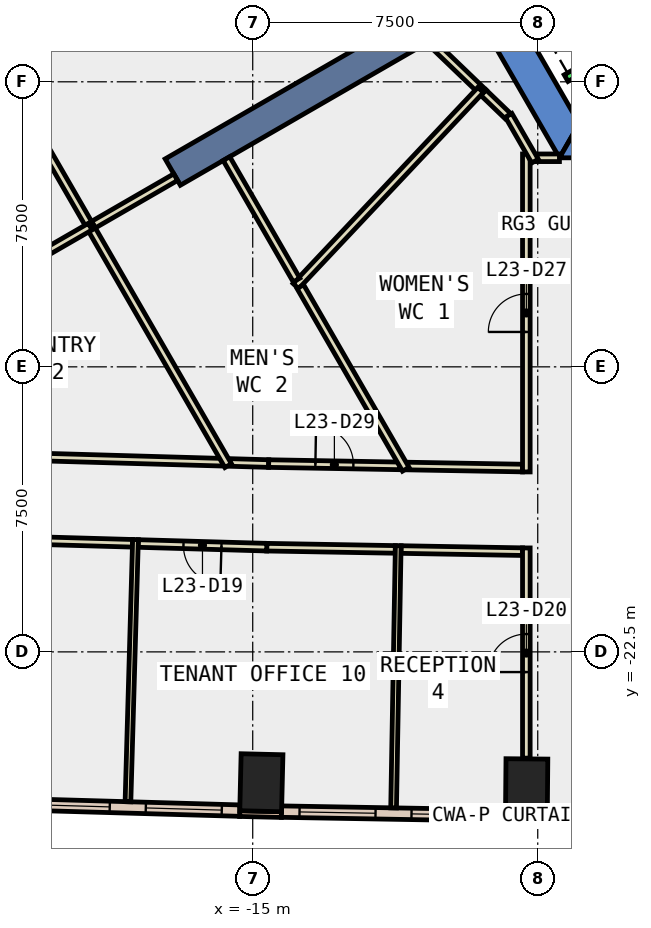
"""IFC4 building model, lengths in metres.
Left out: names, types, materials, properties, quantities, classifications, styles, units other than length and angle.
Written with IfcOpenShell. Run it as: python <this file> out.ifc"""

import sys

from ifc_helpers import new_model, si_unit, direction, frame, frame_2d, origin, origin_2d, place, context, subcontext, project, spatial, polyline, rectangle, outline, extrude, element, fill, save


model = new_model("IFC4")
c1 = context("Model", 3, precision=1e-05, world=origin(), true_north=direction((0.0, 1.0)))
c2 = subcontext(c1, "Body", "Model", "MODEL_VIEW")
j1 = project(units=[si_unit("LENGTHUNIT", "METRE"), si_unit("PLANEANGLEUNIT", "RADIAN")], contexts=[c1])
p1 = place(None, origin())
s1 = spatial("IfcSite", under=j1, at=p1, CompositionType="ELEMENT")
p2 = place(p1, origin())
s2 = spatial("IfcBuilding", under=s1, at=p2, CompositionType="ELEMENT")
p3 = place(p2, frame((0.0, 0.0, 107.6)))
s3 = spatial("IfcBuildingStorey", under=s2, at=p3, CompositionType="ELEMENT", Elevation=107.6)
for number, where, z_axis, x_axis in (
    (1, (-14.773, -25.943, -0.4), (0.0, 0.0, 1.0), (-1.0, 0.024, 0.0)),
    (2, (-7.792, -26.066, -0.4), (0.0, 0.0, 1.0), (-1.0, 0.009, 0.0)),
):
    element("IfcColumn", number, at=place(p3, frame(where, z_axis=z_axis, x_axis=x_axis)), inside=s3, PredefinedType="COLUMN", context=c2, shape_type="SweptSolid", body=[
        extrude(rectangle(XDim=1.1, YDim=1.5, at=origin_2d()), origin(), (0.0, 0.0, 1.0), 4.2),
    ])
p4 = place(p3, frame((0.0, 0.0, -0.4)))
e3 = element("IfcWall", 3, at=p4, inside=s3, PredefinedType="SHEAR", context=c2, shape_type="SweptSolid", body=[
    extrude(outline(polyline([(-13.856, 2.5), (-6.928, -9.5), (-6.409, -8.6), (-12.817, 2.5), (-13.856, 2.5)])), origin(), (0.0, 0.0, 1.0), 4.2),
])
p5 = place(p3, frame((0.0, 0.0, -0.4)))
e4 = element("IfcWall", 4, at=p5, inside=s3, PredefinedType="SHEAR", context=c2, shape_type="SweptSolid", body=[
    extrude(outline(polyline([(3.75, -9.5), (3.75, -8.6), (-6.409, -8.6), (-6.928, -9.5), (3.75, -9.5)])), origin(), (0.0, 0.0, 1.0), 4.2),
])
p6 = place(p3, frame((-9.31, -5.375, -0.4), z_axis=(0.0, 0.0, 1.0), x_axis=(-0.866017533419, -0.500013631625, 0.0)))
e5 = element("IfcWall", 5, at=p6, inside=s3, PredefinedType="SHEAR", context=c2, shape_type="SweptSolid", body=[
    extrude(rectangle(XDim=9.0, YDim=0.8, at=frame_2d((4.5, 0.0))), origin(), (0.0, 0.0, 1.0), 4.2),
])
p7 = place(p3, frame((-15.343, -26.755, 0.0), z_axis=(0.0, 0.0, 1.0), x_axis=(0.999718180159, -0.023739424163, 0.0)))
e6 = element("IfcWall", 6, at=p7, inside=s3, PredefinedType="STANDARD", context=c2, shape_type="SweptSolid", body=[
    extrude(rectangle(XDim=1.1, YDim=0.15, at=frame_2d((0.55, 0.0))), origin(), (0.0, 0.0, 1.0), 3.8),
])
p8 = place(p3, frame((-8.349, -26.886, 0.0), z_axis=(0.0, 0.0, 1.0), x_axis=(0.99995860686, -0.009098602504, 0.0)))
e7 = element("IfcWall", 7, at=p8, inside=s3, PredefinedType="STANDARD", context=c2, shape_type="SweptSolid", body=[
    extrude(rectangle(XDim=1.1, YDim=0.15, at=frame_2d((0.55, 0.0))), origin(), (0.0, 0.0, 1.0), 3.8),
])
p9 = place(p3, frame((-21.235, -26.508, 0.0), z_axis=(0.0, 0.0, 1.0), x_axis=(0.999589583914, -0.028647229026, 0.0)))
e8 = element("IfcWall", 8, at=p9, inside=s3, PredefinedType="STANDARD", context=c2, shape_type="SweptSolid", body=[
    extrude(rectangle(XDim=5.897, YDim=0.3, at=frame_2d((2.949, 0.0))), origin(), (0.0, 0.0, 1.0), 3.8),
])
p10 = place(p9, frame((0.474, 0.0, 0.9)))
e9 = element("IfcOpeningElement", 9, at=p10, cuts=e8, PredefinedType="OPENING", context=c2, shape_type="SweptSolid", body=[
    extrude(rectangle(XDim=2.0, YDim=2.6, at=frame_2d((1.0, 1.3))), frame((0.0, 0.16, 0.0), z_axis=(0.0, -1.0, 0.0), x_axis=(1.0, 0.0, 0.0)), (0.0, 0.0, 1.0), 0.32),
])
p11 = place(p9, frame((3.423, 0.0, 0.9)))
e10 = element("IfcOpeningElement", 10, at=p11, cuts=e8, PredefinedType="OPENING", context=c2, shape_type="SweptSolid", body=[
    extrude(rectangle(XDim=2.0, YDim=2.6, at=frame_2d((1.0, 1.3))), frame((0.0, 0.16, 0.0), z_axis=(0.0, -1.0, 0.0), x_axis=(1.0, 0.0, 0.0)), (0.0, 0.0, 1.0), 0.32),
])
p12 = place(p3, frame((-14.242, -26.703, 0.0), z_axis=(0.0, 0.0, 1.0), x_axis=(0.999847261365, -0.017477240672, 0.0)))
e11 = element("IfcWall", 11, at=p12, inside=s3, PredefinedType="STANDARD", context=c2, shape_type="SweptSolid", body=[
    extrude(rectangle(XDim=5.895, YDim=0.3, at=frame_2d((2.948, 0.0))), origin(), (0.0, 0.0, 1.0), 3.8),
])
p13 = place(p12, frame((0.474, 0.0, 0.9)))
e12 = element("IfcOpeningElement", 12, at=p13, cuts=e11, PredefinedType="OPENING", context=c2, shape_type="SweptSolid", body=[
    extrude(rectangle(XDim=2.0, YDim=2.6, at=frame_2d((1.0, 1.3))), frame((0.0, 0.16, 0.0), z_axis=(0.0, -1.0, 0.0), x_axis=(1.0, 0.0, 0.0)), (0.0, 0.0, 1.0), 0.32),
])
p14 = place(p12, frame((3.421, 0.0, 0.9)))
e13 = element("IfcOpeningElement", 13, at=p14, cuts=e11, PredefinedType="OPENING", context=c2, shape_type="SweptSolid", body=[
    extrude(rectangle(XDim=2.0, YDim=2.6, at=frame_2d((1.0, 1.3))), frame((0.0, 0.16, 0.0), z_axis=(0.0, -1.0, 0.0), x_axis=(1.0, 0.0, 0.0)), (0.0, 0.0, 1.0), 0.32),
])
p15 = place(p3, frame((-10.923, -17.61, 0.0), z_axis=(0.0, 0.0, 1.0), x_axis=(0.999846489632, -0.017521334753, 0.0)))
e14 = element("IfcWall", 14, at=p15, inside=s3, PredefinedType="PARTITIONING", context=c2, shape_type="SweptSolid", body=[
    extrude(rectangle(XDim=3.024, YDim=0.2, at=frame_2d((1.512, 0.0))), origin(), (0.0, 0.0, 1.0), 3.8),
])
p16 = place(p3, frame((-15.596, -17.516, 0.0), z_axis=(0.0, 0.0, 1.0), x_axis=(0.99959813819, -0.028347171427, 0.0)))
e15 = element("IfcWall", 15, at=p16, inside=s3, PredefinedType="PARTITIONING", context=c2, shape_type="SweptSolid", body=[
    extrude(rectangle(XDim=1.016, YDim=0.2, at=frame_2d((0.508, 0.0))), origin(), (0.0, 0.0, 1.0), 3.8),
])
p17 = place(p3, frame((-14.58, -17.545, 0.0), z_axis=(0.0, 0.0, 1.0), x_axis=(0.999844180431, -0.01765261618, 0.0)))
e16 = element("IfcWall", 16, at=p17, inside=s3, PredefinedType="PARTITIONING", context=c2, shape_type="SweptSolid", body=[
    extrude(rectangle(XDim=3.458, YDim=0.2, at=frame_2d((1.729, 0.0))), origin(), (0.0, 0.0, 1.0), 3.8),
])
p18 = place(p17, frame((1.229, 0.0, 0.0)))
e17 = element("IfcOpeningElement", 17, at=p18, cuts=e16, PredefinedType="OPENING", context=c2, shape_type="SweptSolid", body=[
    extrude(rectangle(XDim=1.0, YDim=2.1, at=frame_2d((0.5, 1.05))), frame((0.0, 0.11, 0.0), z_axis=(0.0, -1.0, 0.0), x_axis=(1.0, 0.0, 0.0)), (0.0, 0.0, 1.0), 0.22),
])
p19 = place(p3, frame((-21.471, -17.347, 0.0), z_axis=(0.0, 0.0, 1.0), x_axis=(0.999587337564, -0.028725504044, 0.0)))
e18 = element("IfcWall", 18, at=p19, inside=s3, PredefinedType="PARTITIONING", context=c2, shape_type="SweptSolid", body=[
    extrude(rectangle(XDim=5.677, YDim=0.2, at=frame_2d((2.839, 0.0))), origin(), (0.0, 0.0, 1.0), 3.8),
])
p20 = place(p3, frame((-18.163, -19.643, 0.0), z_axis=(0.0, 0.0, 1.0), x_axis=(-0.999588017684, 0.028701827504, 0.0)))
e19 = element("IfcWall", 19, at=p20, inside=s3, PredefinedType="PARTITIONING", context=c2, shape_type="SweptSolid", body=[
    extrude(rectangle(XDim=3.385, YDim=0.2, at=frame_2d((1.693, 0.0))), origin(), (0.0, 0.0, 1.0), 3.8),
])
p21 = place(p3, frame((-11.248, -19.804, 0.0), z_axis=(0.0, 0.0, 1.0), x_axis=(-0.999848794654, 0.017389302123, 0.0)))
e20 = element("IfcWall", 20, at=p21, inside=s3, PredefinedType="PARTITIONING", context=c2, shape_type="SweptSolid", body=[
    extrude(rectangle(XDim=3.384, YDim=0.2, at=frame_2d((1.692, 0.0))), origin(), (0.0, 0.0, 1.0), 3.8),
])
p22 = place(p3, frame((-14.631, -19.745, 0.0), z_axis=(0.0, 0.0, 1.0), x_axis=(-0.999587482491, 0.028720460441, 0.0)))
e21 = element("IfcWall", 21, at=p22, inside=s3, PredefinedType="PARTITIONING", context=c2, shape_type="SweptSolid", body=[
    extrude(rectangle(XDim=3.383, YDim=0.2, at=frame_2d((1.692, 0.0))), origin(), (0.0, 0.0, 1.0), 3.8),
])
p23 = place(p22, frame((1.192, 0.0, 0.0)))
e22 = element("IfcOpeningElement", 22, at=p23, cuts=e21, PredefinedType="OPENING", context=c2, shape_type="SweptSolid", body=[
    extrude(rectangle(XDim=1.0, YDim=2.1, at=frame_2d((0.5, 1.05))), frame((0.0, 0.11, 0.0), z_axis=(0.0, -1.0, 0.0), x_axis=(1.0, 0.0, 0.0)), (0.0, 0.0, 1.0), 0.22),
])
p24 = place(p3, frame((-7.9, -19.863, 0.0), z_axis=(0.0, 0.0, 1.0), x_axis=(-0.999845883554, 0.017555886191, 0.0)))
e23 = element("IfcWall", 23, at=p24, inside=s3, PredefinedType="PARTITIONING", context=c2, shape_type="SweptSolid", body=[
    extrude(rectangle(XDim=3.198, YDim=0.2, at=frame_2d((1.599, 0.0))), origin(), (0.0, 0.0, 1.0), 3.8),
])
p25 = place(p3, frame((-7.522, -9.499, 0.0), z_axis=(0.0, 0.0, 1.0), x_axis=(1.0, 0.0, 0.0)))
e24 = element("IfcWall", 24, at=p25, inside=s3, PredefinedType="PARTITIONING", context=c2, shape_type="SweptSolid", body=[
    extrude(rectangle(XDim=0.593, YDim=0.2, at=frame_2d((0.296, 0.0))), origin(), (0.0, 0.0, 1.0), 3.8),
])
p26 = place(p3, frame((-7.8, -17.765, 0.0), z_axis=(0.0, 0.0, 1.0), x_axis=(0.0, 1.0, 0.0)))
e25 = element("IfcWall", 25, at=p26, inside=s3, PredefinedType="PARTITIONING", context=c2, shape_type="SweptSolid", body=[
    extrude(rectangle(XDim=8.366, YDim=0.2, at=frame_2d((4.183, 0.0))), origin(), (0.0, 0.0, 1.0), 3.8),
])
p27 = place(p26, frame((3.683, 0.0, 0.0)))
e26 = element("IfcOpeningElement", 26, at=p27, cuts=e25, PredefinedType="OPENING", context=c2, shape_type="SweptSolid", body=[
    extrude(rectangle(XDim=1.0, YDim=2.1, at=frame_2d((0.5, 1.05))), frame((0.0, 0.11, 0.0), z_axis=(0.0, -1.0, 0.0), x_axis=(1.0, 0.0, 0.0)), (0.0, 0.0, 1.0), 0.22),
])
p28 = place(p3, frame((-7.8, -25.296, 0.0), z_axis=(0.0, 0.0, 1.0), x_axis=(0.0, 1.0, 0.0)))
e27 = element("IfcWall", 27, at=p28, inside=s3, PredefinedType="PARTITIONING", context=c2, shape_type="SweptSolid", body=[
    extrude(rectangle(XDim=5.531, YDim=0.2, at=frame_2d((2.766, 0.0))), origin(), (0.0, 0.0, 1.0), 3.8),
])
p29 = place(p28, frame((2.265, 0.0, 0.0)))
e28 = element("IfcOpeningElement", 28, at=p29, cuts=e27, PredefinedType="OPENING", context=c2, shape_type="SweptSolid", body=[
    extrude(rectangle(XDim=1.0, YDim=2.1, at=frame_2d((0.5, 1.05))), frame((0.0, 0.11, 0.0), z_axis=(0.0, -1.0, 0.0), x_axis=(1.0, 0.0, 0.0)), (0.0, 0.0, 1.0), 0.22),
])
p30 = place(p3, frame((-8.93, -7.783, 0.0), z_axis=(0.0, 0.0, 1.0), x_axis=(0.720954255291, -0.692982656189, 0.0)))
e29 = element("IfcWall", 29, at=p30, inside=s3, PredefinedType="PARTITIONING", context=c2, shape_type="SweptSolid", body=[
    extrude(rectangle(XDim=0.89, YDim=0.2, at=frame_2d((0.445, 0.0))), origin(), (0.0, 0.0, 1.0), 3.8),
])
p31 = place(p3, frame((-7.572, -9.586, 0.0), z_axis=(0.0, 0.0, 1.0), x_axis=(-0.499484152563, 0.866323023669, 0.0)))
e30 = element("IfcWall", 30, at=p31, inside=s3, PredefinedType="PARTITIONING", context=c2, shape_type="SweptSolid", body=[
    extrude(rectangle(XDim=1.39, YDim=0.2, at=frame_2d((0.695, 0.0))), origin(), (0.0, 0.0, 1.0), 3.8),
])
p32 = place(p3, frame((-8.93, -7.783, 0.0), z_axis=(0.0, 0.0, 1.0), x_axis=(-0.72124523191, 0.692679807305, 0.0)))
e31 = element("IfcWall", 31, at=p32, inside=s3, PredefinedType="PARTITIONING", context=c2, shape_type="SweptSolid", body=[
    extrude(rectangle(XDim=1.923, YDim=0.2, at=frame_2d((0.961, 0.0))), origin(), (0.0, 0.0, 1.0), 3.8),
])
p33 = place(p3, frame((-13.865, -12.876, 0.0), z_axis=(0.0, 0.0, 1.0), x_axis=(0.685651384846, 0.727930064263, 0.0)))
e32 = element("IfcWall", 32, at=p33, inside=s3, PredefinedType="PARTITIONING", context=c2, shape_type="SweptSolid", body=[
    extrude(rectangle(XDim=7.091, YDim=0.2, at=frame_2d((3.545, 0.0))), origin(), (0.0, 0.0, 1.0), 3.8),
])
p34 = place(p3, frame((-10.973, -17.695, 0.0), z_axis=(0.0, 0.0, 1.0), x_axis=(-0.499986535608, 0.866033177315, 0.0)))
e33 = element("IfcWall", 33, at=p34, inside=s3, PredefinedType="PARTITIONING", context=c2, shape_type="SweptSolid", body=[
    extrude(rectangle(XDim=5.549, YDim=0.2, at=frame_2d((2.774, 0.0))), origin(), (0.0, 0.0, 1.0), 3.8),
])
p35 = place(p3, frame((-13.847, -12.716, 0.0), z_axis=(0.0, 0.0, 1.0), x_axis=(-0.499861859587, 0.866105144501, 0.0)))
e34 = element("IfcWall", 34, at=p35, inside=s3, PredefinedType="PARTITIONING", context=c2, shape_type="SweptSolid", body=[
    extrude(rectangle(XDim=3.689, YDim=0.2, at=frame_2d((1.844, 0.0))), origin(), (0.0, 0.0, 1.0), 3.8),
])
p36 = place(p3, frame((-17.027, -10.009, 0.0), z_axis=(0.0, 0.0, 1.0), x_axis=(-0.865950948929, -0.500128937424, 0.0)))
e35 = element("IfcWall", 35, at=p36, inside=s3, PredefinedType="PARTITIONING", context=c2, shape_type="SweptSolid", body=[
    extrude(rectangle(XDim=2.599, YDim=0.2, at=frame_2d((1.3, 0.0))), origin(), (0.0, 0.0, 1.0), 3.8),
])
p37 = place(p3, frame((-19.278, -11.309, 0.0), z_axis=(0.0, 0.0, 1.0), x_axis=(-0.500044545065, 0.865999684151, 0.0)))
e36 = element("IfcWall", 36, at=p37, inside=s3, PredefinedType="PARTITIONING", context=c2, shape_type="SweptSolid", body=[
    extrude(rectangle(XDim=7.261, YDim=0.2, at=frame_2d((3.63, 0.0))), origin(), (0.0, 0.0, 1.0), 3.8),
])
p38 = place(p3, frame((-15.646, -17.6, 0.0), z_axis=(0.0, 0.0, 1.0), x_axis=(-0.499953299825, 0.866052364464, 0.0)))
e37 = element("IfcWall", 37, at=p38, inside=s3, PredefinedType="PARTITIONING", context=c2, shape_type="SweptSolid", body=[
    extrude(rectangle(XDim=7.263, YDim=0.2, at=frame_2d((3.631, 0.0))), origin(), (0.0, 0.0, 1.0), 3.8),
])
p39 = place(p3, frame((-19.277, -11.311, 0.0), z_axis=(0.0, 0.0, 1.0), x_axis=(-0.866078939042, -0.499907262747, 0.0)))
e38 = element("IfcWall", 38, at=p39, inside=s3, PredefinedType="PARTITIONING", context=c2, shape_type="SweptSolid", body=[
    extrude(rectangle(XDim=10.864, YDim=0.2, at=frame_2d((5.432, 0.0))), origin(), (0.0, 0.0, 1.0), 3.8),
])
p40 = place(p3, frame((-18.085, -19.545, 0.0), z_axis=(0.0, 0.0, 1.0), x_axis=(-0.02869106823, -0.999588326564, 0.0)))
e39 = element("IfcWall", 39, at=p40, inside=s3, PredefinedType="PARTITIONING", context=c2, shape_type="SweptSolid", body=[
    extrude(rectangle(XDim=6.901, YDim=0.15, at=frame_2d((3.451, 0.0))), origin(), (0.0, 0.0, 1.0), 3.8),
])
p41 = place(p3, frame((-11.171, -19.706, 0.0), z_axis=(0.0, 0.0, 1.0), x_axis=(-0.017691335128, -0.999843496084, 0.0)))
e40 = element("IfcWall", 40, at=p41, inside=s3, PredefinedType="PARTITIONING", context=c2, shape_type="SweptSolid", body=[
    extrude(rectangle(XDim=6.9, YDim=0.15, at=frame_2d((3.45, 0.0))), origin(), (0.0, 0.0, 1.0), 3.8),
])
p42 = place(p3, frame((-4.588, -6.153, 0.0), z_axis=(0.0, 0.0, 1.0), x_axis=(-0.866022959057, -0.500004234368, 0.0)))
e41 = element("IfcWall", 41, at=p42, inside=s3, PredefinedType="STANDARD", context=c2, shape_type="SweptSolid", body=[
    extrude(rectangle(XDim=2.5, YDim=0.2, at=frame_2d((1.25, 0.0))), origin(), (0.0, 0.0, 1.0), 3.8),
])
p43 = place(p10, origin())
e42 = element("IfcWindow", 42, at=p43, inside=s3, PartitioningType="SINGLE_PANEL", PredefinedType="WINDOW", context=c2, shape_type="SweptSolid", body=[
    extrude(rectangle(XDim=2.0, YDim=2.6, at=frame_2d((1.0, 1.3))), frame((0.0, 0.03, 0.0), z_axis=(0.0, -1.0, 0.0), x_axis=(1.0, 0.0, 0.0)), (0.0, 0.0, 1.0), 0.06),
])
fill(e9, e42)
p44 = place(p11, origin())
e43 = element("IfcWindow", 43, at=p44, inside=s3, PartitioningType="SINGLE_PANEL", PredefinedType="WINDOW", context=c2, shape_type="SweptSolid", body=[
    extrude(rectangle(XDim=2.0, YDim=2.6, at=frame_2d((1.0, 1.3))), frame((0.0, 0.03, 0.0), z_axis=(0.0, -1.0, 0.0), x_axis=(1.0, 0.0, 0.0)), (0.0, 0.0, 1.0), 0.06),
])
fill(e10, e43)
p45 = place(p13, origin())
e44 = element("IfcWindow", 44, at=p45, inside=s3, PartitioningType="SINGLE_PANEL", PredefinedType="WINDOW", context=c2, shape_type="SweptSolid", body=[
    extrude(rectangle(XDim=2.0, YDim=2.6, at=frame_2d((1.0, 1.3))), frame((0.0, 0.03, 0.0), z_axis=(0.0, -1.0, 0.0), x_axis=(1.0, 0.0, 0.0)), (0.0, 0.0, 1.0), 0.06),
])
fill(e12, e44)
p46 = place(p14, origin())
e45 = element("IfcWindow", 45, at=p46, inside=s3, PartitioningType="SINGLE_PANEL", PredefinedType="WINDOW", context=c2, shape_type="SweptSolid", body=[
    extrude(rectangle(XDim=2.0, YDim=2.6, at=frame_2d((1.0, 1.3))), frame((0.0, 0.03, 0.0), z_axis=(0.0, -1.0, 0.0), x_axis=(1.0, 0.0, 0.0)), (0.0, 0.0, 1.0), 0.06),
])
fill(e13, e45)
p47 = place(p23, origin())
e46 = element("IfcDoor", 46, at=p47, inside=s3, OperationType="SINGLE_SWING_RIGHT", PredefinedType="DOOR", context=c2, shape_type="SweptSolid", body=[
    extrude(rectangle(XDim=1.0, YDim=2.1, at=frame_2d((0.5, 1.05))), frame((0.0, 0.025, 0.0), z_axis=(0.0, -1.0, 0.0), x_axis=(1.0, 0.0, 0.0)), (0.0, 0.0, 1.0), 0.05),
])
fill(e22, e46)
p48 = place(p29, origin())
e47 = element("IfcDoor", 47, at=p48, inside=s3, OperationType="SINGLE_SWING_LEFT", PredefinedType="DOOR", context=c2, shape_type="SweptSolid", body=[
    extrude(rectangle(XDim=1.0, YDim=2.1, at=frame_2d((0.5, 1.05))), frame((0.0, 0.025, 0.0), z_axis=(0.0, -1.0, 0.0), x_axis=(1.0, 0.0, 0.0)), (0.0, 0.0, 1.0), 0.05),
])
fill(e28, e47)
p49 = place(p27, origin())
e48 = element("IfcDoor", 48, at=p49, inside=s3, OperationType="SINGLE_SWING_RIGHT", PredefinedType="DOOR", context=c2, shape_type="SweptSolid", body=[
    extrude(rectangle(XDim=1.0, YDim=2.1, at=frame_2d((0.5, 1.05))), frame((0.0, 0.025, 0.0), z_axis=(0.0, -1.0, 0.0), x_axis=(1.0, 0.0, 0.0)), (0.0, 0.0, 1.0), 0.05),
])
fill(e26, e48)
p50 = place(p18, origin())
e49 = element("IfcDoor", 49, at=p50, inside=s3, OperationType="SINGLE_SWING_LEFT", PredefinedType="DOOR", context=c2, shape_type="SweptSolid", body=[
    extrude(rectangle(XDim=1.0, YDim=2.1, at=frame_2d((0.5, 1.05))), frame((0.0, 0.025, 0.0), z_axis=(0.0, -1.0, 0.0), x_axis=(1.0, 0.0, 0.0)), (0.0, 0.0, 1.0), 0.05),
])
fill(e17, e49)
save(model, sys.argv[1])
